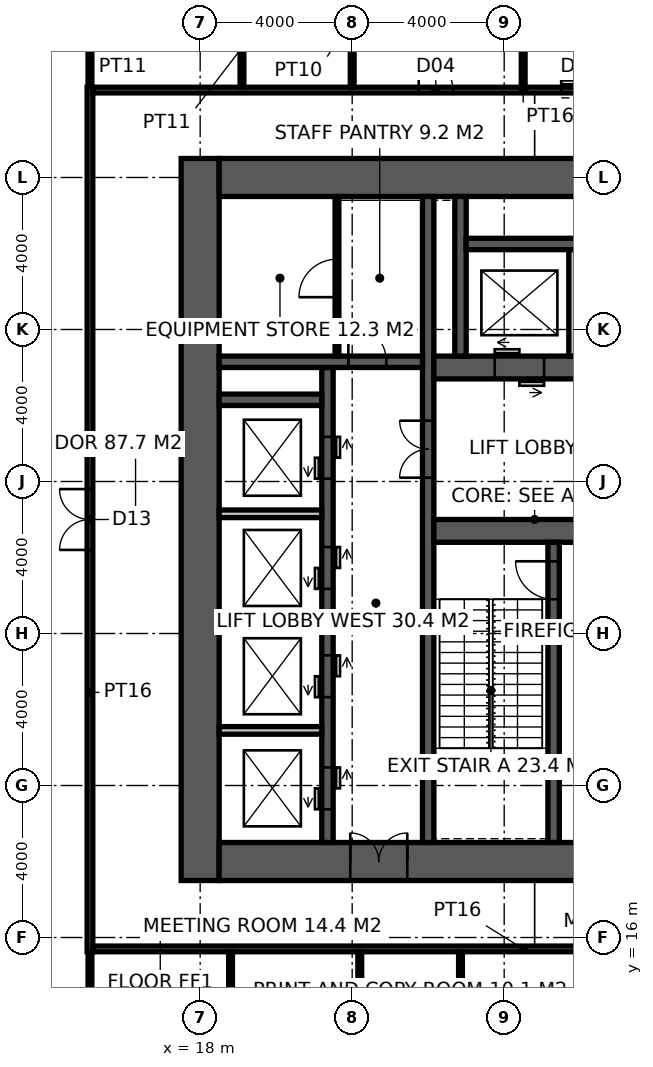
"""IFC4 building model, lengths in metres.
Left out: names, types, materials, properties, quantities, classifications, styles, units other than length and angle.
Written with IfcOpenShell. Run it as: python <this file> out.ifc"""

import sys

from ifc_helpers import new_model, si_unit, direction, frame, frame_2d, origin, place, context, subcontext, project, spatial, rectangle, extrude, element, fill, save


model = new_model("IFC4")
c1 = context("Model", 3, precision=1e-05, world=origin(), true_north=direction((0.0, 1.0)))
c2 = subcontext(c1, "Body", "Model", "MODEL_VIEW")
j1 = project(units=[si_unit("LENGTHUNIT", "METRE"), si_unit("PLANEANGLEUNIT", "RADIAN")], contexts=[c1])
p1 = place(None, origin())
s1 = spatial("IfcSite", under=j1, at=p1, CompositionType="ELEMENT")
p2 = place(p1, origin())
s2 = spatial("IfcBuilding", under=s1, at=p2, CompositionType="ELEMENT")
p3 = place(p2, frame((0.0, 0.0, 76.4)))
s3 = spatial("IfcBuildingStorey", under=s2, at=p3, CompositionType="ELEMENT", Elevation=76.4)
p4 = place(p3, frame((18.0, 17.5, -0.15), z_axis=(0.0, 0.0, 1.0), x_axis=(0.0, 1.0, 0.0)))
e1 = element("IfcWall", 1, at=p4, inside=s3, PredefinedType="SHEAR", context=c2, shape_type="SweptSolid", body=[
    extrude(rectangle(XDim=19.0, YDim=1.0, at=frame_2d((9.5, 0.0))), origin(), (0.0, 0.0, 1.0), 5.0),
])
p5 = place(p3, frame((18.5, 18.0, -0.15), z_axis=(0.0, 0.0, 1.0), x_axis=(1.0, 0.0, 0.0)))
e2 = element("IfcWall", 2, at=p5, inside=s3, PredefinedType="SHEAR", context=c2, shape_type="SweptSolid", body=[
    extrude(rectangle(XDim=17.6, YDim=1.0, at=frame_2d((8.8, 0.0))), origin(), (0.0, 0.0, 1.0), 5.0),
])
p6 = place(p5, frame((3.45, 0.0, 0.15)))
e3 = element("IfcOpeningElement", 3, at=p6, cuts=e2, PredefinedType="OPENING", context=c2, shape_type="SweptSolid", body=[
    extrude(rectangle(XDim=1.5, YDim=2.4, at=frame_2d((0.75, 1.2))), frame((0.0, 0.51, 0.0), z_axis=(0.0, -1.0, 0.0), x_axis=(1.0, 0.0, 0.0)), (0.0, 0.0, 1.0), 1.02),
])
p7 = place(p3, frame((18.5, 36.0, -0.15), z_axis=(0.0, 0.0, 1.0), x_axis=(1.0, 0.0, 0.0)))
e4 = element("IfcWall", 4, at=p7, inside=s3, PredefinedType="SHEAR", context=c2, shape_type="SweptSolid", body=[
    extrude(rectangle(XDim=17.6, YDim=1.0, at=frame_2d((8.8, 0.0))), origin(), (0.0, 0.0, 1.0), 5.0),
])
p8 = place(p3, frame((24.0, 18.5, -0.15), z_axis=(0.0, 0.0, 1.0), x_axis=(0.0, 1.0, 0.0)))
e5 = element("IfcWall", 5, at=p8, inside=s3, PredefinedType="SHEAR", context=c2, shape_type="SweptSolid", body=[
    extrude(rectangle(XDim=17.0, YDim=0.3, at=frame_2d((8.5, 0.0))), origin(), (0.0, 0.0, 1.0), 5.0),
])
p9 = place(p8, frame((9.6, 0.0, 0.15)))
e6 = element("IfcOpeningElement", 6, at=p9, cuts=e5, PredefinedType="OPENING", context=c2, shape_type="SweptSolid", body=[
    extrude(rectangle(XDim=1.5, YDim=2.4, at=frame_2d((0.75, 1.2))), frame((0.0, 0.16, 0.0), z_axis=(0.0, -1.0, 0.0), x_axis=(1.0, 0.0, 0.0)), (0.0, 0.0, 1.0), 0.32),
])
p10 = place(p3, frame((24.15, 26.7, -0.15), z_axis=(0.0, 0.0, 1.0), x_axis=(1.0, 0.0, 0.0)))
e7 = element("IfcWall", 7, at=p10, inside=s3, PredefinedType="SHEAR", context=c2, shape_type="SweptSolid", body=[
    extrude(rectangle(XDim=11.25, YDim=0.6, at=frame_2d((5.625, 0.0))), origin(), (0.0, 0.0, 1.0), 5.0),
])
p11 = place(p10, frame((9.25, 0.0, 0.15)))
e8 = element("IfcOpeningElement", 8, at=p11, cuts=e7, PredefinedType="OPENING", context=c2, shape_type="SweptSolid", body=[
    extrude(rectangle(XDim=1.0, YDim=2.2, at=frame_2d((0.5, 1.1))), frame((0.0, 0.31, 0.0), z_axis=(0.0, -1.0, 0.0), x_axis=(1.0, 0.0, 0.0)), (0.0, 0.0, 1.0), 0.62),
])
p12 = place(p10, frame((4.9, 0.0, 0.15)))
e9 = element("IfcOpeningElement", 9, at=p12, cuts=e7, PredefinedType="OPENING", context=c2, shape_type="SweptSolid", body=[
    extrude(rectangle(XDim=1.5, YDim=2.4, at=frame_2d((0.75, 1.2))), frame((0.0, 0.31, 0.0), z_axis=(0.0, -1.0, 0.0), x_axis=(1.0, 0.0, 0.0)), (0.0, 0.0, 1.0), 0.62),
])
p13 = place(p3, frame((27.3, 18.5, -0.15), z_axis=(0.0, 0.0, 1.0), x_axis=(0.0, 1.0, 0.0)))
e10 = element("IfcWall", 10, at=p13, inside=s3, PredefinedType="SHEAR", context=c2, shape_type="SweptSolid", body=[
    extrude(rectangle(XDim=7.9, YDim=0.3, at=frame_2d((3.95, 0.0))), origin(), (0.0, 0.0, 1.0), 5.0),
])
p14 = place(p13, frame((6.4, 0.0, 0.15)))
e11 = element("IfcOpeningElement", 11, at=p14, cuts=e10, PredefinedType="OPENING", context=c2, shape_type="SweptSolid", body=[
    extrude(rectangle(XDim=1.0, YDim=2.2, at=frame_2d((0.5, 1.1))), frame((0.0, 0.16, 0.0), z_axis=(0.0, -1.0, 0.0), x_axis=(1.0, 0.0, 0.0)), (0.0, 0.0, 1.0), 0.32),
])
p15 = place(p3, frame((24.15, 31.0, -0.15), z_axis=(0.0, 0.0, 1.0), x_axis=(1.0, 0.0, 0.0)))
e12 = element("IfcWall", 12, at=p15, inside=s3, PredefinedType="SHEAR", context=c2, shape_type="SweptSolid", body=[
    extrude(rectangle(XDim=11.25, YDim=0.6, at=frame_2d((5.625, 0.0))), origin(), (0.0, 0.0, 1.0), 5.0),
])
p16 = place(p15, frame((1.6, 0.0, 0.15)))
e13 = element("IfcOpeningElement", 13, at=p16, cuts=e12, PredefinedType="OPENING", context=c2, shape_type="SweptSolid", body=[
    extrude(rectangle(XDim=1.3, YDim=2.4, at=frame_2d((0.65, 1.2))), frame((0.0, 0.31, 0.0), z_axis=(0.0, -1.0, 0.0), x_axis=(1.0, 0.0, 0.0)), (0.0, 0.0, 1.0), 0.62),
])
p17 = place(p15, frame((4.4, 0.0, 0.15)))
e14 = element("IfcOpeningElement", 14, at=p17, cuts=e12, PredefinedType="OPENING", context=c2, shape_type="SweptSolid", body=[
    extrude(rectangle(XDim=1.3, YDim=2.4, at=frame_2d((0.65, 1.2))), frame((0.0, 0.31, 0.0), z_axis=(0.0, -1.0, 0.0), x_axis=(1.0, 0.0, 0.0)), (0.0, 0.0, 1.0), 0.62),
])
p18 = place(p15, frame((7.25, 0.0, 0.15)))
e15 = element("IfcOpeningElement", 15, at=p18, cuts=e12, PredefinedType="OPENING", context=c2, shape_type="SweptSolid", body=[
    extrude(rectangle(XDim=1.4, YDim=2.4, at=frame_2d((0.7, 1.2))), frame((0.0, 0.31, 0.0), z_axis=(0.0, -1.0, 0.0), x_axis=(1.0, 0.0, 0.0)), (0.0, 0.0, 1.0), 0.62),
])
p19 = place(p3, frame((21.35, 18.5, -0.15), z_axis=(0.0, 0.0, 1.0), x_axis=(0.0, 1.0, 0.0)))
e16 = element("IfcWall", 16, at=p19, inside=s3, PredefinedType="SHEAR", context=c2, shape_type="SweptSolid", body=[
    extrude(rectangle(XDim=12.5, YDim=0.3, at=frame_2d((6.25, 0.0))), origin(), (0.0, 0.0, 1.0), 5.0),
])
p20 = place(p19, frame((0.875, 0.0, 0.15)))
e17 = element("IfcOpeningElement", 17, at=p20, cuts=e16, PredefinedType="OPENING", context=c2, shape_type="SweptSolid", body=[
    extrude(rectangle(XDim=1.1, YDim=2.2, at=frame_2d((0.55, 1.1))), frame((0.0, 0.16, 0.0), z_axis=(0.0, -1.0, 0.0), x_axis=(1.0, 0.0, 0.0)), (0.0, 0.0, 1.0), 0.32),
])
p21 = place(p19, frame((3.825, 0.0, 0.15)))
e18 = element("IfcOpeningElement", 18, at=p21, cuts=e16, PredefinedType="OPENING", context=c2, shape_type="SweptSolid", body=[
    extrude(rectangle(XDim=1.1, YDim=2.2, at=frame_2d((0.55, 1.1))), frame((0.0, 0.16, 0.0), z_axis=(0.0, -1.0, 0.0), x_axis=(1.0, 0.0, 0.0)), (0.0, 0.0, 1.0), 0.32),
])
p22 = place(p19, frame((6.675, 0.0, 0.15)))
e19 = element("IfcOpeningElement", 19, at=p22, cuts=e16, PredefinedType="OPENING", context=c2, shape_type="SweptSolid", body=[
    extrude(rectangle(XDim=1.1, YDim=2.2, at=frame_2d((0.55, 1.1))), frame((0.0, 0.16, 0.0), z_axis=(0.0, -1.0, 0.0), x_axis=(1.0, 0.0, 0.0)), (0.0, 0.0, 1.0), 0.32),
])
p23 = place(p19, frame((9.575, 0.0, 0.15)))
e20 = element("IfcOpeningElement", 20, at=p23, cuts=e16, PredefinedType="OPENING", context=c2, shape_type="SweptSolid", body=[
    extrude(rectangle(XDim=1.1, YDim=2.2, at=frame_2d((0.55, 1.1))), frame((0.0, 0.16, 0.0), z_axis=(0.0, -1.0, 0.0), x_axis=(1.0, 0.0, 0.0)), (0.0, 0.0, 1.0), 0.32),
])
p24 = place(p3, frame((18.5, 31.15, -0.15), z_axis=(0.0, 0.0, 1.0), x_axis=(1.0, 0.0, 0.0)))
e21 = element("IfcWall", 21, at=p24, inside=s3, PredefinedType="SHEAR", context=c2, shape_type="SweptSolid", body=[
    extrude(rectangle(XDim=5.35, YDim=0.3, at=frame_2d((2.675, 0.0))), origin(), (0.0, 0.0, 1.0), 5.0),
])
p25 = place(p24, frame((3.4, 0.0, 0.15)))
e22 = element("IfcOpeningElement", 22, at=p25, cuts=e21, PredefinedType="OPENING", context=c2, shape_type="SweptSolid", body=[
    extrude(rectangle(XDim=1.0, YDim=2.2, at=frame_2d((0.5, 1.1))), frame((0.0, 0.16, 0.0), z_axis=(0.0, -1.0, 0.0), x_axis=(1.0, 0.0, 0.0)), (0.0, 0.0, 1.0), 0.32),
])
p26 = place(p3, frame((18.5, 30.15, -0.15), z_axis=(0.0, 0.0, 1.0), x_axis=(1.0, 0.0, 0.0)))
e23 = element("IfcWall", 23, at=p26, inside=s3, PredefinedType="SHEAR", context=c2, shape_type="SweptSolid", body=[
    extrude(rectangle(XDim=2.7, YDim=0.3, at=frame_2d((1.35, 0.0))), origin(), (0.0, 0.0, 1.0), 5.0),
])
p27 = place(p3, frame((24.85, 31.3, -0.15), z_axis=(0.0, 0.0, 1.0), x_axis=(0.0, 1.0, 0.0)))
e24 = element("IfcWall", 24, at=p27, inside=s3, PredefinedType="SHEAR", context=c2, shape_type="SweptSolid", body=[
    extrude(rectangle(XDim=4.2, YDim=0.3, at=frame_2d((2.1, 0.0))), origin(), (0.0, 0.0, 1.0), 5.0),
])
p28 = place(p3, frame((25.0, 34.25, -0.15), z_axis=(0.0, 0.0, 1.0), x_axis=(1.0, 0.0, 0.0)))
e25 = element("IfcWall", 25, at=p28, inside=s3, PredefinedType="SHEAR", context=c2, shape_type="SweptSolid", body=[
    extrude(rectangle(XDim=8.6, YDim=0.3, at=frame_2d((4.3, 0.0))), origin(), (0.0, 0.0, 1.0), 5.0),
])
p29 = place(p3, frame((27.8, 31.3, -0.15), z_axis=(0.0, 0.0, 1.0), x_axis=(0.0, 1.0, 0.0)))
e26 = element("IfcWall", 26, at=p29, inside=s3, PredefinedType="SOLIDWALL", context=c2, shape_type="SweptSolid", body=[
    extrude(rectangle(XDim=2.8, YDim=0.2, at=frame_2d((1.4, 0.0))), origin(), (0.0, 0.0, 1.0), 5.0),
])
for number, where, z_axis, x_axis in (
    (27, (18.5, 21.45, -0.15), (0.0, 0.0, 1.0), (1.0, 0.0, 0.0)),
    (28, (18.5, 24.3, -0.15), (0.0, 0.0, 1.0), (1.0, 0.0, 0.0)),
    (29, (18.5, 27.15, -0.15), (0.0, 0.0, 1.0), (1.0, 0.0, 0.0)),
):
    element("IfcWall", number, at=place(p3, frame(where, z_axis=z_axis, x_axis=x_axis)), inside=s3, PredefinedType="SOLIDWALL", context=c2, shape_type="SweptSolid", body=[
        extrude(rectangle(XDim=2.7, YDim=0.2, at=frame_2d((1.35, 0.0))), origin(), (0.0, 0.0, 1.0), 5.0),
    ])
p30 = place(p3, frame((21.6, 31.3, 0.0), z_axis=(0.0, 0.0, 1.0), x_axis=(0.0, 1.0, 0.0)))
e30 = element("IfcWall", 30, at=p30, inside=s3, PredefinedType="PARTITIONING", context=c2, shape_type="SweptSolid", body=[
    extrude(rectangle(XDim=4.2, YDim=0.1, at=frame_2d((2.1, 0.0))), origin(), (0.0, 0.0, 1.0), 4.85),
])
p31 = place(p30, frame((1.55, 0.0, 0.0)))
e31 = element("IfcOpeningElement", 31, at=p31, cuts=e30, PredefinedType="OPENING", context=c2, shape_type="SweptSolid", body=[
    extrude(rectangle(XDim=1.0, YDim=2.2, at=frame_2d((0.5, 1.1))), frame((0.0, 0.06, 0.0), z_axis=(0.0, -1.0, 0.0), x_axis=(1.0, 0.0, 0.0)), (0.0, 0.0, 1.0), 0.12),
])
p32 = place(p3, frame((15.1, 15.625, 0.0), z_axis=(0.0, 0.0, 1.0), x_axis=(0.0, 1.0, 0.0)))
e32 = element("IfcWall", 32, at=p32, inside=s3, PredefinedType="PARTITIONING", context=c2, shape_type="SweptSolid", body=[
    extrude(rectangle(XDim=22.75, YDim=0.15, at=frame_2d((11.375, 0.0))), origin(), (0.0, 0.0, 1.0), 4.85),
])
p33 = place(p32, frame((10.575, 0.0, 0.0)))
e33 = element("IfcOpeningElement", 33, at=p33, cuts=e32, PredefinedType="OPENING", context=c2, shape_type="SweptSolid", body=[
    extrude(rectangle(XDim=1.6, YDim=2.7, at=frame_2d((0.8, 1.35))), frame((0.0, 0.085, 0.0), z_axis=(0.0, -1.0, 0.0), x_axis=(1.0, 0.0, 0.0)), (0.0, 0.0, 1.0), 0.17),
])
p34 = place(p3, frame((15.175, 15.7, 0.0), z_axis=(0.0, 0.0, 1.0), x_axis=(1.0, 0.0, 0.0)))
e34 = element("IfcWall", 34, at=p34, inside=s3, PredefinedType="PARTITIONING", context=c2, shape_type="SweptSolid", body=[
    extrude(rectangle(XDim=22.65, YDim=0.15, at=frame_2d((11.325, 0.0))), origin(), (0.0, 0.0, 1.0), 4.85),
])
p35 = place(p3, frame((15.175, 38.3, 0.0), z_axis=(0.0, 0.0, 1.0), x_axis=(1.0, 0.0, 0.0)))
e35 = element("IfcWall", 35, at=p35, inside=s3, PredefinedType="PARTITIONING", context=c2, shape_type="SweptSolid", body=[
    extrude(rectangle(XDim=22.65, YDim=0.15, at=frame_2d((11.325, 0.0))), origin(), (0.0, 0.0, 1.0), 4.85),
])
p36 = place(p35, frame((8.575, 0.0, 0.0)))
e36 = element("IfcOpeningElement", 36, at=p36, cuts=e35, PredefinedType="OPENING", context=c2, shape_type="SweptSolid", body=[
    extrude(rectangle(XDim=0.9, YDim=2.1, at=frame_2d((0.45, 1.05))), frame((0.0, 0.085, 0.0), z_axis=(0.0, -1.0, 0.0), x_axis=(1.0, 0.0, 0.0)), (0.0, 0.0, 1.0), 0.17),
])
p37 = place(p35, frame((12.325, 0.0, 0.0)))
e37 = element("IfcOpeningElement", 37, at=p37, cuts=e35, PredefinedType="OPENING", context=c2, shape_type="SweptSolid", body=[
    extrude(rectangle(XDim=1.0, YDim=2.1, at=frame_2d((0.5, 1.05))), frame((0.0, 0.085, 0.0), z_axis=(0.0, -1.0, 0.0), x_axis=(1.0, 0.0, 0.0)), (0.0, 0.0, 1.0), 0.17),
])
p38 = place(p35, frame((16.175, 0.0, 0.0)))
e38 = element("IfcOpeningElement", 38, at=p38, cuts=e35, PredefinedType="OPENING", context=c2, shape_type="SweptSolid", body=[
    extrude(rectangle(XDim=0.9, YDim=2.1, at=frame_2d((0.45, 1.05))), frame((0.0, 0.085, 0.0), z_axis=(0.0, -1.0, 0.0), x_axis=(1.0, 0.0, 0.0)), (0.0, 0.0, 1.0), 0.17),
])
p39 = place(p3, frame((22.0, 38.375, 0.0), z_axis=(0.0, 0.0, 1.0), x_axis=(0.0, 1.0, 0.0)))
e39 = element("IfcWall", 39, at=p39, inside=s3, PredefinedType="PARTITIONING", context=c2, shape_type="SweptSolid", body=[
    extrude(rectangle(XDim=3.675, YDim=0.1, at=frame_2d((1.837, 0.0))), origin(), (0.0, 0.0, 1.0), 3.95),
])
p40 = place(p3, frame((26.5, 38.375, 0.0), z_axis=(0.0, 0.0, 1.0), x_axis=(0.0, 1.0, 0.0)))
e40 = element("IfcWall", 40, at=p40, inside=s3, PredefinedType="PARTITIONING", context=c2, shape_type="SweptSolid", body=[
    extrude(rectangle(XDim=3.575, YDim=0.1, at=frame_2d((1.788, 0.0))), origin(), (0.0, 0.0, 1.0), 4.85),
])
p41 = place(p3, frame((15.1, 11.55, 0.0), z_axis=(0.0, 0.0, 1.0), x_axis=(0.0, 1.0, 0.0)))
e41 = element("IfcWall", 41, at=p41, inside=s3, PredefinedType="PARTITIONING", context=c2, shape_type="SweptSolid", body=[
    extrude(rectangle(XDim=4.075, YDim=0.1, at=frame_2d((2.038, 0.0))), origin(), (0.0, 0.0, 1.0), 4.85),
])
p42 = place(p3, frame((15.1, 38.375, 0.0), z_axis=(0.0, 0.0, 1.0), x_axis=(0.0, 1.0, 0.0)))
e42 = element("IfcWall", 42, at=p42, inside=s3, PredefinedType="PARTITIONING", context=c2, shape_type="SweptSolid", body=[
    extrude(rectangle(XDim=3.475, YDim=0.1, at=frame_2d((1.738, 0.0))), origin(), (0.0, 0.0, 1.0), 4.85),
])
p43 = place(p3, frame((18.8, 11.55, 0.0), z_axis=(0.0, 0.0, 1.0), x_axis=(0.0, 1.0, 0.0)))
e43 = element("IfcWall", 43, at=p43, inside=s3, PredefinedType="PARTITIONING", context=c2, shape_type="SweptSolid", body=[
    extrude(rectangle(XDim=4.075, YDim=0.1, at=frame_2d((2.038, 0.0))), origin(), (0.0, 0.0, 1.0), 4.85),
])
p44 = place(p3, frame((19.1, 38.375, 0.0), z_axis=(0.0, 0.0, 1.0), x_axis=(0.0, 1.0, 0.0)))
e44 = element("IfcWall", 44, at=p44, inside=s3, PredefinedType="PARTITIONING", context=c2, shape_type="SweptSolid", body=[
    extrude(rectangle(XDim=3.475, YDim=0.1, at=frame_2d((1.738, 0.0))), origin(), (0.0, 0.0, 1.0), 4.85),
])
for number, where, z_axis, x_axis in (
    (45, (22.2, 11.55, 0.0), (0.0, 0.0, 1.0), (0.0, 1.0, 0.0)),
    (46, (24.85, 11.55, 0.0), (0.0, 0.0, 1.0), (0.0, 1.0, 0.0)),
):
    element("IfcWall", number, at=place(p3, frame(where, z_axis=z_axis, x_axis=x_axis)), inside=s3, PredefinedType="PARTITIONING", context=c2, shape_type="SweptSolid", body=[
        extrude(rectangle(XDim=4.075, YDim=0.1, at=frame_2d((2.038, 0.0))), origin(), (0.0, 0.0, 1.0), 4.85),
    ])
p45 = place(p14, origin())
e47 = element("IfcDoor", 47, at=p45, inside=s3, OperationType="SINGLE_SWING_RIGHT", PredefinedType="DOOR", context=c2, shape_type="SweptSolid", body=[
    extrude(rectangle(XDim=1.0, YDim=2.2, at=frame_2d((0.5, 1.1))), frame((0.0, 0.025, 0.0), z_axis=(0.0, -1.0, 0.0), x_axis=(1.0, 0.0, 0.0)), (0.0, 0.0, 1.0), 0.05),
])
fill(e11, e47)
p46 = place(p9, origin())
e48 = element("IfcDoor", 48, at=p46, inside=s3, OperationType="DOUBLE_DOOR_DOUBLE_SWING", PredefinedType="DOOR", context=c2, shape_type="SweptSolid", body=[
    extrude(rectangle(XDim=1.5, YDim=2.4, at=frame_2d((0.75, 1.2))), frame((0.0, 0.025, 0.0), z_axis=(0.0, -1.0, 0.0), x_axis=(1.0, 0.0, 0.0)), (0.0, 0.0, 1.0), 0.05),
])
fill(e6, e48)
p47 = place(p25, origin())
e49 = element("IfcDoor", 49, at=p47, inside=s3, OperationType="SINGLE_SWING_LEFT", PredefinedType="DOOR", context=c2, shape_type="SweptSolid", body=[
    extrude(rectangle(XDim=1.0, YDim=2.2, at=frame_2d((0.5, 1.1))), frame((0.0, 0.025, 0.0), z_axis=(0.0, -1.0, 0.0), x_axis=(1.0, 0.0, 0.0)), (0.0, 0.0, 1.0), 0.05),
])
fill(e22, e49)
p48 = place(p31, origin())
e50 = element("IfcDoor", 50, at=p48, inside=s3, OperationType="SINGLE_SWING_LEFT", PredefinedType="DOOR", context=c2, shape_type="SweptSolid", body=[
    extrude(rectangle(XDim=1.0, YDim=2.2, at=frame_2d((0.5, 1.1))), frame((0.0, 0.025, 0.0), z_axis=(0.0, -1.0, 0.0), x_axis=(1.0, 0.0, 0.0)), (0.0, 0.0, 1.0), 0.05),
])
fill(e31, e50)
p49 = place(p6, origin())
e51 = element("IfcDoor", 51, at=p49, inside=s3, OperationType="DOUBLE_DOOR_DOUBLE_SWING", PredefinedType="DOOR", context=c2, shape_type="SweptSolid", body=[
    extrude(rectangle(XDim=1.5, YDim=2.4, at=frame_2d((0.75, 1.2))), frame((0.0, 0.025, 0.0), z_axis=(0.0, -1.0, 0.0), x_axis=(1.0, 0.0, 0.0)), (0.0, 0.0, 1.0), 0.05),
])
fill(e3, e51)
p50 = place(p36, origin())
e52 = element("IfcDoor", 52, at=p50, inside=s3, OperationType="SINGLE_SWING_LEFT", PredefinedType="DOOR", context=c2, shape_type="SweptSolid", body=[
    extrude(rectangle(XDim=0.9, YDim=2.1, at=frame_2d((0.45, 1.05))), frame((0.0, 0.025, 0.0), z_axis=(0.0, -1.0, 0.0), x_axis=(1.0, 0.0, 0.0)), (0.0, 0.0, 1.0), 0.05),
])
fill(e36, e52)
p51 = place(p37, origin())
e53 = element("IfcDoor", 53, at=p51, inside=s3, OperationType="SLIDING_TO_LEFT", PredefinedType="DOOR", context=c2, shape_type="SweptSolid", body=[
    extrude(rectangle(XDim=1.0, YDim=2.1, at=frame_2d((0.5, 1.05))), frame((0.0, 0.025, 0.0), z_axis=(0.0, -1.0, 0.0), x_axis=(1.0, 0.0, 0.0)), (0.0, 0.0, 1.0), 0.05),
])
fill(e37, e53)
p52 = place(p33, origin())
e54 = element("IfcDoor", 54, at=p52, inside=s3, OperationType="DOUBLE_DOOR_DOUBLE_SWING", PredefinedType="DOOR", context=c2, shape_type="SweptSolid", body=[
    extrude(rectangle(XDim=1.6, YDim=2.7, at=frame_2d((0.8, 1.35))), frame((0.0, 0.025, 0.0), z_axis=(0.0, -1.0, 0.0), x_axis=(1.0, 0.0, 0.0)), (0.0, 0.0, 1.0), 0.05),
])
fill(e33, e54)
p53 = place(p16, origin())
e55 = element("IfcDoor", 55, at=p53, inside=s3, OperationType="DOUBLE_DOOR_SLIDING", PredefinedType="DOOR", context=c2, shape_type="SweptSolid", body=[
    extrude(rectangle(XDim=1.3, YDim=2.4, at=frame_2d((0.65, 1.2))), frame((0.0, 0.025, 0.0), z_axis=(0.0, -1.0, 0.0), x_axis=(1.0, 0.0, 0.0)), (0.0, 0.0, 1.0), 0.05),
])
fill(e13, e55)
p54 = place(p20, origin())
e56 = element("IfcDoor", 56, at=p54, inside=s3, OperationType="DOUBLE_DOOR_SLIDING", PredefinedType="DOOR", context=c2, shape_type="SweptSolid", body=[
    extrude(rectangle(XDim=1.1, YDim=2.2, at=frame_2d((0.55, 1.1))), frame((0.0, 0.025, 0.0), z_axis=(0.0, -1.0, 0.0), x_axis=(1.0, 0.0, 0.0)), (0.0, 0.0, 1.0), 0.05),
])
fill(e17, e56)
p55 = place(p21, origin())
e57 = element("IfcDoor", 57, at=p55, inside=s3, OperationType="DOUBLE_DOOR_SLIDING", PredefinedType="DOOR", context=c2, shape_type="SweptSolid", body=[
    extrude(rectangle(XDim=1.1, YDim=2.2, at=frame_2d((0.55, 1.1))), frame((0.0, 0.025, 0.0), z_axis=(0.0, -1.0, 0.0), x_axis=(1.0, 0.0, 0.0)), (0.0, 0.0, 1.0), 0.05),
])
fill(e18, e57)
p56 = place(p22, origin())
e58 = element("IfcDoor", 58, at=p56, inside=s3, OperationType="DOUBLE_DOOR_SLIDING", PredefinedType="DOOR", context=c2, shape_type="SweptSolid", body=[
    extrude(rectangle(XDim=1.1, YDim=2.2, at=frame_2d((0.55, 1.1))), frame((0.0, 0.025, 0.0), z_axis=(0.0, -1.0, 0.0), x_axis=(1.0, 0.0, 0.0)), (0.0, 0.0, 1.0), 0.05),
])
fill(e19, e58)
p57 = place(p23, origin())
e59 = element("IfcDoor", 59, at=p57, inside=s3, OperationType="DOUBLE_DOOR_SLIDING", PredefinedType="DOOR", context=c2, shape_type="SweptSolid", body=[
    extrude(rectangle(XDim=1.1, YDim=2.2, at=frame_2d((0.55, 1.1))), frame((0.0, 0.025, 0.0), z_axis=(0.0, -1.0, 0.0), x_axis=(1.0, 0.0, 0.0)), (0.0, 0.0, 1.0), 0.05),
])
fill(e20, e59)
save(model, sys.argv[1])
